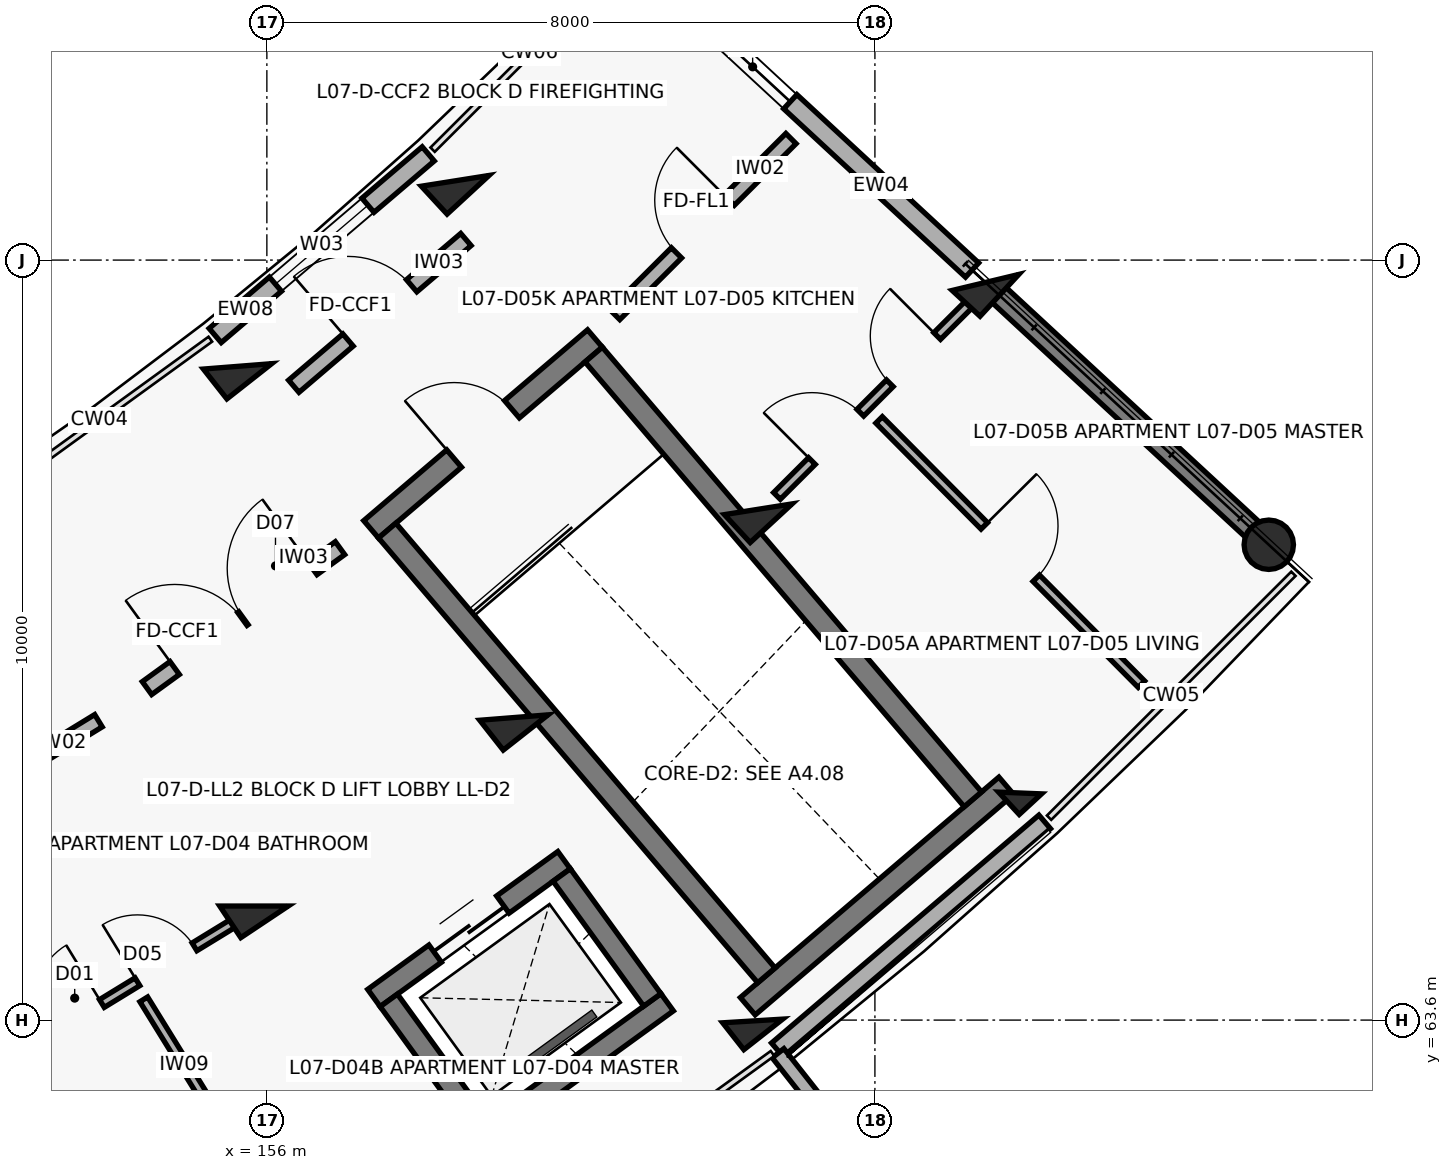
"""IFC4 building model, lengths in metres.
Left out: names, types, materials, properties, quantities, classifications, styles, units other than length and angle.
Written with IfcOpenShell. Run it as: python <this file> out.ifc"""

import sys

from ifc_helpers import new_model, si_unit, direction, frame, frame_2d, origin, origin_2d, place, context, subcontext, project, spatial, rectangle, circle, extrude, element, fill, save


model = new_model("IFC4")
c1 = context("Model", 3, precision=1e-05, world=origin(), true_north=direction((0.0, 1.0)))
c2 = subcontext(c1, "Body", "Model", "MODEL_VIEW")
j1 = project(units=[si_unit("LENGTHUNIT", "METRE"), si_unit("PLANEANGLEUNIT", "RADIAN")], contexts=[c1])
p1 = place(None, origin())
s1 = spatial("IfcSite", under=j1, at=p1, CompositionType="ELEMENT")
p2 = place(p1, origin())
s2 = spatial("IfcBuilding", under=s1, at=p2, CompositionType="ELEMENT")
p3 = place(p2, frame((0.0, 0.0, 23.6)))
s3 = spatial("IfcBuildingStorey", under=s2, at=p3, CompositionType="ELEMENT", Elevation=23.6)
for number, where, z_axis, x_axis in (
    (1, (155.831, 65.101, 0.0), (0.0, 0.0, 1.0), (0.555, -0.832, 0.0)),
    (2, (155.614, 72.202, 0.0), (0.0, 0.0, 1.0), (0.618, -0.786, 0.0)),
    (3, (159.25, 67.581, 0.0), (0.0, 0.0, 1.0), (0.618, -0.786, 0.0)),
):
    element("IfcColumn", number, at=place(p3, frame(where, z_axis=z_axis, x_axis=x_axis)), inside=s3, PredefinedType="COLUMN", context=c2, shape_type="SweptSolid", body=[
        extrude(rectangle(XDim=0.5, YDim=0.75, at=origin_2d()), origin(), (0.0, 0.0, 1.0), 3.1),
    ])
p4 = place(p3, frame((162.392, 63.589, 0.0), z_axis=(0.0, 0.0, 1.0), x_axis=(0.618408395358, -0.785856893175, 0.0)))
e4 = element("IfcColumn", 4, at=p4, inside=s3, PredefinedType="COLUMN", context=c2, shape_type="SweptSolid", body=[
    extrude(rectangle(XDim=0.45, YDim=0.65, at=origin_2d()), origin(), (0.0, 0.0, 1.0), 3.1),
])
for number, where, z_axis, x_axis in (
    (5, (158.477, 74.643, 0.0), (0.0, 0.0, 1.0), (0.678, -0.735, 0.0)),
    (6, (162.465, 70.322, 0.0), (0.0, 0.0, 1.0), (0.678, -0.735, 0.0)),
):
    element("IfcColumn", number, at=place(p3, frame(where, z_axis=z_axis, x_axis=x_axis)), inside=s3, PredefinedType="COLUMN", context=c2, shape_type="SweptSolid", body=[
        extrude(rectangle(XDim=0.5, YDim=0.75, at=origin_2d()), origin(), (0.0, 0.0, 1.0), 3.1),
    ])
p5 = place(p3, frame((165.91, 66.588, 0.0), z_axis=(0.0, 0.0, 1.0), x_axis=(0.678159669868, -0.73491459515, 0.0)))
e7 = element("IfcColumn", 7, at=p5, inside=s3, PredefinedType="COLUMN", context=c2, shape_type="SweptSolid", body=[
    extrude(rectangle(XDim=0.4, YDim=0.4, at=origin_2d()), origin(), (0.0, 0.0, 1.0), 3.1),
])
p6 = place(p3, frame((165.455, 73.306, 0.0), z_axis=(0.0, 0.0, 1.0), x_axis=(0.733729864503, -0.679441304262, 0.0)))
e8 = element("IfcColumn", 8, at=p6, inside=s3, PredefinedType="COLUMN", context=c2, shape_type="SweptSolid", body=[
    extrude(rectangle(XDim=0.5, YDim=0.75, at=origin_2d()), origin(), (0.0, 0.0, 1.0), 3.1),
])
p7 = place(p3, frame((169.182, 69.854, 0.0), z_axis=(0.0, 0.0, 1.0), x_axis=(0.733729864503, -0.679441304262, 0.0)))
e9 = element("IfcColumn", 9, at=p7, inside=s3, PredefinedType="COLUMN", context=c2, shape_type="SweptSolid", body=[
    extrude(circle(Radius=0.325, at=origin_2d()), origin(), (0.0, 0.0, 1.0), 3.1),
])
p8 = place(p3, frame((165.587, 73.184, 0.0), z_axis=(0.0, 0.0, 1.0), x_axis=(0.733739663667, -0.679430721974, 0.0)))
e10 = element("IfcWall", 10, at=p8, inside=s3, PredefinedType="SHEAR", context=c2, shape_type="SweptSolid", body=[
    extrude(rectangle(XDim=4.72, YDim=0.27, at=frame_2d((2.36, 0.0))), origin(), (0.0, 0.0, 1.0), 2.92),
])
p9 = place(p3, frame((162.716, 63.209, 0.0), z_axis=(0.0, 0.0, 1.0), x_axis=(0.760968923704, 0.64878833001, 0.0)))
e11 = element("IfcWall", 11, at=p9, inside=s3, PredefinedType="SOLIDWALL", context=c2, shape_type="SweptSolid", body=[
    extrude(rectangle(XDim=4.623, YDim=0.235, at=frame_2d((2.311, 0.0))), origin(), (0.0, 0.0, 1.0), 2.25),
])
p10 = place(p3, frame((162.726, 63.164, 0.0), z_axis=(0.0, 0.0, 1.0), x_axis=(0.618456270212, -0.785819217019, 0.0)))
e12 = element("IfcWall", 12, at=p10, inside=s3, PredefinedType="PARAPET", context=c2, shape_type="SweptSolid", body=[
    extrude(rectangle(XDim=0.9, YDim=0.195, at=frame_2d((0.45, 0.0))), origin(), (0.0, 0.0, 1.0), 2.25),
])
p11 = place(p3, frame((155.32, 72.608, 0.0), z_axis=(0.0, 0.0, 1.0), x_axis=(0.760985049259, 0.648769415743, 0.0)))
e13 = element("IfcWall", 13, at=p11, inside=s3, PredefinedType="SOLIDWALL", context=c2, shape_type="SweptSolid", body=[
    extrude(rectangle(XDim=3.683, YDim=0.245, at=frame_2d((1.842, 0.0))), origin(), (0.0, 0.0, 1.0), 2.25),
])
p12 = place(p11, frame((1.042, 0.0, 0.32)))
e14 = element("IfcOpeningElement", 14, at=p12, cuts=e13, PredefinedType="OPENING", context=c2, shape_type="SweptSolid", body=[
    extrude(rectangle(XDim=1.6, YDim=1.5, at=frame_2d((0.8, 0.75))), frame((0.0, 0.133, 0.0), z_axis=(0.0, -1.0, 0.0), x_axis=(1.0, 0.0, 0.0)), (0.0, 0.0, 1.0), 0.265),
])
p13 = place(p3, frame((161.316, 77.138, 0.0), z_axis=(0.0, 0.0, 1.0), x_axis=(0.733734795505, -0.679435979225, 0.0)))
e15 = element("IfcWall", 15, at=p13, inside=s3, PredefinedType="SOLIDWALL", context=c2, shape_type="SweptSolid", body=[
    extrude(rectangle(XDim=5.4, YDim=0.255, at=frame_2d((2.7, 0.0))), origin(), (0.0, 0.0, 1.0), 2.24),
])
p14 = place(p13, frame((0.79, 0.0, 0.75)))
e16 = element("IfcOpeningElement", 16, at=p14, cuts=e15, PredefinedType="OPENING", context=c2, shape_type="SweptSolid", body=[
    extrude(rectangle(XDim=1.35, YDim=1.35, at=frame_2d((0.675, 0.675))), frame((0.0, 0.137, 0.0), z_axis=(0.0, -1.0, 0.0), x_axis=(1.0, 0.0, 0.0)), (0.0, 0.0, 1.0), 0.275),
])
p15 = place(p3, frame((157.372, 70.058, 0.0), z_axis=(0.0, 0.0, 1.0), x_axis=(0.760990583254, 0.648762924495, 0.0)))
e17 = element("IfcWall", 17, at=p15, inside=s3, PredefinedType="SHEAR", context=c2, shape_type="SweptSolid", body=[
    extrude(rectangle(XDim=3.87, YDim=0.3, at=frame_2d((1.935, 0.0))), origin(), (0.0, 0.0, 1.0), 3.1),
])
p16 = place(p15, frame((1.435, 0.0, 0.0)))
e18 = element("IfcOpeningElement", 18, at=p16, cuts=e17, PredefinedType="OPENING", context=c2, shape_type="SweptSolid", body=[
    extrude(rectangle(XDim=1.0, YDim=2.15, at=frame_2d((0.5, 1.075))), frame((0.0, 0.16, 0.0), z_axis=(0.0, -1.0, 0.0), x_axis=(1.0, 0.0, 0.0)), (0.0, 0.0, 1.0), 0.32),
])
p17 = place(p3, frame((162.327, 63.783, 0.0), z_axis=(0.0, 0.0, 1.0), x_axis=(0.760969560012, 0.648787583678, 0.0)))
e19 = element("IfcWall", 19, at=p17, inside=s3, PredefinedType="SHEAR", context=c2, shape_type="SweptSolid", body=[
    extrude(rectangle(XDim=4.47, YDim=0.3, at=frame_2d((2.235, 0.0))), origin(), (0.0, 0.0, 1.0), 3.1),
])
p18 = place(p3, frame((157.583, 70.041, 0.0), z_axis=(0.0, 0.0, 1.0), x_axis=(0.648762810187, -0.760990680704, 0.0)))
e20 = element("IfcWall", 20, at=p18, inside=s3, PredefinedType="SHEAR", context=c2, shape_type="SweptSolid", body=[
    extrude(rectangle(XDim=7.69, YDim=0.3, at=frame_2d((3.845, 0.0))), origin(), (0.0, 0.0, 1.0), 3.1),
])
p19 = place(p3, frame((160.3, 72.357, 0.0), z_axis=(0.0, 0.0, 1.0), x_axis=(0.648781194888, -0.760975006922, 0.0)))
e21 = element("IfcWall", 21, at=p19, inside=s3, PredefinedType="SHEAR", context=c2, shape_type="SweptSolid", body=[
    extrude(rectangle(XDim=7.69, YDim=0.3, at=frame_2d((3.845, 0.0))), origin(), (0.0, 0.0, 1.0), 3.1),
])
p20 = place(p3, frame((157.409, 63.89, 0.0), z_axis=(0.0, 0.0, 1.0), x_axis=(0.809510936031, 0.587104798521, 0.0)))
e22 = element("IfcWall", 22, at=p20, inside=s3, PredefinedType="SHEAR", context=c2, shape_type="SweptSolid", body=[
    extrude(rectangle(XDim=3.09, YDim=0.28, at=frame_2d((1.545, 0.0))), origin(), (0.0, 0.0, 1.0), 3.1),
])
p21 = place(p20, frame((0.995, 0.0, 0.0)))
e23 = element("IfcOpeningElement", 23, at=p21, cuts=e22, PredefinedType="OPENING", context=c2, shape_type="SweptSolid", body=[
    extrude(rectangle(XDim=1.1, YDim=2.15, at=frame_2d((0.55, 1.075))), frame((0.0, 0.15, 0.0), z_axis=(0.0, -1.0, 0.0), x_axis=(1.0, 0.0, 0.0)), (0.0, 0.0, 1.0), 0.3),
])
p22 = place(p3, frame((158.765, 62.021, 0.0), z_axis=(0.0, 0.0, 1.0), x_axis=(0.809548485838, 0.587053020669, 0.0)))
e24 = element("IfcWall", 24, at=p22, inside=s3, PredefinedType="SHEAR", context=c2, shape_type="SweptSolid", body=[
    extrude(rectangle(XDim=3.09, YDim=0.28, at=frame_2d((1.545, 0.0))), origin(), (0.0, 0.0, 1.0), 3.1),
])
p23 = place(p3, frame((157.604, 63.859, 0.0), z_axis=(0.0, 0.0, 1.0), x_axis=(0.587127188998, -0.809494696671, 0.0)))
e25 = element("IfcWall", 25, at=p23, inside=s3, PredefinedType="SHEAR", context=c2, shape_type="SweptSolid", body=[
    extrude(rectangle(XDim=2.03, YDim=0.28, at=frame_2d((1.015, 0.0))), origin(), (0.0, 0.0, 1.0), 3.1),
])
p24 = place(p3, frame((159.879, 65.509, 0.0), z_axis=(0.0, 0.0, 1.0), x_axis=(0.58704837408, -0.809551855344, 0.0)))
e26 = element("IfcWall", 26, at=p24, inside=s3, PredefinedType="SHEAR", context=c2, shape_type="SweptSolid", body=[
    extrude(rectangle(XDim=2.03, YDim=0.28, at=frame_2d((1.015, 0.0))), origin(), (0.0, 0.0, 1.0), 3.1),
])
p25 = place(p3, frame((150.989, 65.829, 0.0), z_axis=(0.0, 0.0, 1.0), x_axis=(0.853090237845, 0.521763400492, 0.0)))
e27 = element("IfcWall", 27, at=p25, inside=s3, PredefinedType="SOLIDWALL", context=c2, shape_type="SweptSolid", body=[
    extrude(rectangle(XDim=3.277, YDim=0.19, at=frame_2d((1.638, 0.0))), origin(), (0.0, 0.0, 1.0), 2.14),
])
p26 = place(p25, frame((1.128, 0.0, 0.0)))
e28 = element("IfcOpeningElement", 28, at=p26, cuts=e27, PredefinedType="OPENING", context=c2, shape_type="SweptSolid", body=[
    extrude(rectangle(XDim=1.02, YDim=2.15, at=frame_2d((0.51, 1.075))), frame((0.0, 0.105, 0.0), z_axis=(0.0, -1.0, 0.0), x_axis=(1.0, 0.0, 0.0)), (0.0, 0.0, 1.0), 0.21),
])
p27 = place(p3, frame((152.507, 63.01, 0.0), z_axis=(0.0, 0.0, 1.0), x_axis=(0.853110474662, 0.521730311581, 0.0)))
e29 = element("IfcWall", 29, at=p27, inside=s3, PredefinedType="PARTITIONING", context=c2, shape_type="SweptSolid", body=[
    extrude(rectangle(XDim=3.628, YDim=0.12, at=frame_2d((1.814, 0.0))), origin(), (0.0, 0.0, 1.0), 2.14),
])
p28 = place(p27, frame((0.65, 0.0, 0.0)))
e30 = element("IfcOpeningElement", 30, at=p28, cuts=e29, PredefinedType="OPENING", context=c2, shape_type="SweptSolid", body=[
    extrude(rectangle(XDim=0.9, YDim=2.1, at=frame_2d((0.45, 1.05))), frame((0.0, 0.07, 0.0), z_axis=(0.0, -1.0, 0.0), x_axis=(1.0, 0.0, 0.0)), (0.0, 0.0, 1.0), 0.14),
])
p29 = place(p27, frame((2.098, 0.0, 0.0)))
e31 = element("IfcOpeningElement", 31, at=p29, cuts=e29, PredefinedType="OPENING", context=c2, shape_type="SweptSolid", body=[
    extrude(rectangle(XDim=0.88, YDim=2.1, at=frame_2d((0.44, 1.05))), frame((0.0, 0.07, 0.0), z_axis=(0.0, -1.0, 0.0), x_axis=(1.0, 0.0, 0.0)), (0.0, 0.0, 1.0), 0.14),
])
p30 = place(p3, frame((154.38, 63.873, 0.0), z_axis=(0.0, 0.0, 1.0), x_axis=(0.525458935368, -0.850818962672, 0.0)))
e32 = element("IfcWall", 32, at=p30, inside=s3, PredefinedType="PARTITIONING", context=c2, shape_type="SweptSolid", body=[
    extrude(rectangle(XDim=4.9, YDim=0.12, at=frame_2d((2.45, 0.0))), origin(), (0.0, 0.0, 1.0), 2.14),
])
p31 = place(p30, frame((2.025, 0.0, 0.0)))
e33 = element("IfcOpeningElement", 33, at=p31, cuts=e32, PredefinedType="OPENING", context=c2, shape_type="SweptSolid", body=[
    extrude(rectangle(XDim=0.85, YDim=2.1, at=frame_2d((0.425, 1.05))), frame((0.0, 0.07, 0.0), z_axis=(0.0, -1.0, 0.0), x_axis=(1.0, 0.0, 0.0)), (0.0, 0.0, 1.0), 0.14),
])
p32 = place(p3, frame((154.423, 67.968, 0.0), z_axis=(0.0, 0.0, 1.0), x_axis=(0.809516127005, 0.587097641043, 0.0)))
e34 = element("IfcWall", 34, at=p32, inside=s3, PredefinedType="SOLIDWALL", context=c2, shape_type="SweptSolid", body=[
    extrude(rectangle(XDim=3.137, YDim=0.21, at=frame_2d((1.569, 0.0))), origin(), (0.0, 0.0, 1.0), 2.14),
])
p33 = place(p32, frame((0.45, 0.0, 0.0)))
e35 = element("IfcOpeningElement", 35, at=p33, cuts=e34, PredefinedType="OPENING", context=c2, shape_type="SweptSolid", body=[
    extrude(rectangle(XDim=1.1, YDim=2.15, at=frame_2d((0.55, 1.075))), frame((0.0, 0.115, 0.0), z_axis=(0.0, -1.0, 0.0), x_axis=(1.0, 0.0, 0.0)), (0.0, 0.0, 1.0), 0.23),
])
p34 = place(p32, frame((1.567, 0.0, 0.0)))
e36 = element("IfcOpeningElement", 36, at=p34, cuts=e34, PredefinedType="OPENING", context=c2, shape_type="SweptSolid", body=[
    extrude(rectangle(XDim=1.12, YDim=2.15, at=frame_2d((0.56, 1.075))), frame((0.0, 0.115, 0.0), z_axis=(0.0, -1.0, 0.0), x_axis=(1.0, 0.0, 0.0)), (0.0, 0.0, 1.0), 0.23),
])
p35 = place(p3, frame((156.354, 71.94, 0.0), z_axis=(0.0, 0.0, 1.0), x_axis=(0.760991187621, 0.648762215579, 0.0)))
e37 = element("IfcWall", 37, at=p35, inside=s3, PredefinedType="SOLIDWALL", context=c2, shape_type="SweptSolid", body=[
    extrude(rectangle(XDim=2.976, YDim=0.21, at=frame_2d((1.488, 0.0))), origin(), (0.0, 0.0, 1.0), 2.14),
])
p36 = place(p35, frame((0.938, 0.0, 0.0)))
e38 = element("IfcOpeningElement", 38, at=p36, cuts=e37, PredefinedType="OPENING", context=c2, shape_type="SweptSolid", body=[
    extrude(rectangle(XDim=1.1, YDim=2.15, at=frame_2d((0.55, 1.075))), frame((0.0, 0.115, 0.0), z_axis=(0.0, -1.0, 0.0), x_axis=(1.0, 0.0, 0.0)), (0.0, 0.0, 1.0), 0.23),
])
p37 = place(p3, frame((160.576, 72.884, 0.0), z_axis=(0.0, 0.0, 1.0), x_axis=(0.70773973846, 0.706473256822, 0.0)))
e39 = element("IfcWall", 39, at=p37, inside=s3, PredefinedType="SOLIDWALL", context=c2, shape_type="SweptSolid", body=[
    extrude(rectangle(XDim=3.277, YDim=0.19, at=frame_2d((1.639, 0.0))), origin(), (0.0, 0.0, 1.0), 2.14),
])
p38 = place(p37, frame((1.148, 0.0, 0.0)))
e40 = element("IfcOpeningElement", 40, at=p38, cuts=e39, PredefinedType="OPENING", context=c2, shape_type="SweptSolid", body=[
    extrude(rectangle(XDim=0.98, YDim=2.15, at=frame_2d((0.49, 1.075))), frame((0.0, 0.105, 0.0), z_axis=(0.0, -1.0, 0.0), x_axis=(1.0, 0.0, 0.0)), (0.0, 0.0, 1.0), 0.21),
])
p39 = place(p3, frame((162.711, 70.497, 0.0), z_axis=(0.0, 0.0, 1.0), x_axis=(0.70774573777, 0.706467246706, 0.0)))
e41 = element("IfcWall", 41, at=p39, inside=s3, PredefinedType="PARTITIONING", context=c2, shape_type="SweptSolid", body=[
    extrude(rectangle(XDim=3.628, YDim=0.125, at=frame_2d((1.814, 0.0))), origin(), (0.0, 0.0, 1.0), 2.14),
])
p40 = place(p39, frame((0.65, 0.0, 0.0)))
e42 = element("IfcOpeningElement", 42, at=p40, cuts=e41, PredefinedType="OPENING", context=c2, shape_type="SweptSolid", body=[
    extrude(rectangle(XDim=0.9, YDim=2.1, at=frame_2d((0.45, 1.05))), frame((0.0, 0.073, 0.0), z_axis=(0.0, -1.0, 0.0), x_axis=(1.0, 0.0, 0.0)), (0.0, 0.0, 1.0), 0.145),
])
p41 = place(p39, frame((2.098, 0.0, 0.0)))
e43 = element("IfcOpeningElement", 43, at=p41, cuts=e41, PredefinedType="OPENING", context=c2, shape_type="SweptSolid", body=[
    extrude(rectangle(XDim=0.88, YDim=2.1, at=frame_2d((0.44, 1.05))), frame((0.0, 0.073, 0.0), z_axis=(0.0, -1.0, 0.0), x_axis=(1.0, 0.0, 0.0)), (0.0, 0.0, 1.0), 0.145),
])
p42 = place(p3, frame((164.055, 71.497, 0.0), z_axis=(0.0, 0.0, 1.0), x_axis=(0.704461179749, -0.709742521078, 0.0)))
e44 = element("IfcWall", 44, at=p42, inside=s3, PredefinedType="PARTITIONING", context=c2, shape_type="SweptSolid", body=[
    extrude(rectangle(XDim=4.9, YDim=0.12, at=frame_2d((2.45, 0.0))), origin(), (0.0, 0.0, 1.0), 2.14),
])
p43 = place(p42, frame((1.965, 0.0, 0.0)))
e45 = element("IfcOpeningElement", 45, at=p43, cuts=e44, PredefinedType="OPENING", context=c2, shape_type="SweptSolid", body=[
    extrude(rectangle(XDim=0.97, YDim=2.1, at=frame_2d((0.485, 1.05))), frame((0.0, 0.07, 0.0), z_axis=(0.0, -1.0, 0.0), x_axis=(1.0, 0.0, 0.0)), (0.0, 0.0, 1.0), 0.14),
])
p44 = place(p12, origin())
e46 = element("IfcWindow", 46, at=p44, inside=s3, PartitioningType="DOUBLE_PANEL_VERTICAL", PredefinedType="WINDOW", context=c2, shape_type="SweptSolid", body=[
    extrude(rectangle(XDim=1.6, YDim=1.5, at=frame_2d((0.8, 0.75))), frame((0.0, 0.03, 0.0), z_axis=(0.0, -1.0, 0.0), x_axis=(1.0, 0.0, 0.0)), (0.0, 0.0, 1.0), 0.06),
])
fill(e14, e46)
p45 = place(p14, origin())
e47 = element("IfcWindow", 47, at=p45, inside=s3, PartitioningType="DOUBLE_PANEL_VERTICAL", PredefinedType="WINDOW", context=c2, shape_type="SweptSolid", body=[
    extrude(rectangle(XDim=1.35, YDim=1.35, at=frame_2d((0.675, 0.675))), frame((0.0, 0.03, 0.0), z_axis=(0.0, -1.0, 0.0), x_axis=(1.0, 0.0, 0.0)), (0.0, 0.0, 1.0), 0.06),
])
fill(e16, e47)
p46 = place(p16, origin())
e48 = element("IfcDoor", 48, at=p46, inside=s3, OperationType="SINGLE_SWING_LEFT", PredefinedType="DOOR", context=c2, shape_type="SweptSolid", body=[
    extrude(rectangle(XDim=1.0, YDim=2.15, at=frame_2d((0.5, 1.075))), frame((0.0, 0.025, 0.0), z_axis=(0.0, -1.0, 0.0), x_axis=(1.0, 0.0, 0.0)), (0.0, 0.0, 1.0), 0.05),
])
fill(e18, e48)
p47 = place(p21, origin())
e49 = element("IfcDoor", 49, at=p47, inside=s3, OperationType="DOUBLE_DOOR_SLIDING", PredefinedType="DOOR", context=c2, shape_type="SweptSolid", body=[
    extrude(rectangle(XDim=1.1, YDim=2.15, at=frame_2d((0.55, 1.075))), frame((0.0, 0.025, 0.0), z_axis=(0.0, -1.0, 0.0), x_axis=(1.0, 0.0, 0.0)), (0.0, 0.0, 1.0), 0.05),
])
fill(e23, e49)
p48 = place(p28, origin())
e50 = element("IfcDoor", 50, at=p48, inside=s3, OperationType="SINGLE_SWING_RIGHT", PredefinedType="DOOR", context=c2, shape_type="SweptSolid", body=[
    extrude(rectangle(XDim=0.9, YDim=2.1, at=frame_2d((0.45, 1.05))), frame((0.0, 0.025, 0.0), z_axis=(0.0, -1.0, 0.0), x_axis=(1.0, 0.0, 0.0)), (0.0, 0.0, 1.0), 0.05),
])
fill(e30, e50)
p49 = place(p29, origin())
e51 = element("IfcDoor", 51, at=p49, inside=s3, OperationType="SINGLE_SWING_LEFT", PredefinedType="DOOR", context=c2, shape_type="SweptSolid", body=[
    extrude(rectangle(XDim=0.88, YDim=2.1, at=frame_2d((0.44, 1.05))), frame((0.0, 0.025, 0.0), z_axis=(0.0, -1.0, 0.0), x_axis=(1.0, 0.0, 0.0)), (0.0, 0.0, 1.0), 0.05),
])
fill(e31, e51)
p50 = place(p33, origin())
e52 = element("IfcDoor", 52, at=p50, inside=s3, OperationType="SINGLE_SWING_LEFT", PredefinedType="DOOR", context=c2, shape_type="SweptSolid", body=[
    extrude(rectangle(XDim=1.1, YDim=2.15, at=frame_2d((0.55, 1.075))), frame((0.0, 0.025, 0.0), z_axis=(0.0, -1.0, 0.0), x_axis=(1.0, 0.0, 0.0)), (0.0, 0.0, 1.0), 0.05),
])
fill(e35, e52)
p51 = place(p34, origin())
e53 = element("IfcDoor", 53, at=p51, inside=s3, OperationType="SINGLE_SWING_RIGHT", PredefinedType="DOOR", context=c2, shape_type="SweptSolid", body=[
    extrude(rectangle(XDim=1.12, YDim=2.15, at=frame_2d((0.56, 1.075))), frame((0.0, 0.025, 0.0), z_axis=(0.0, -1.0, 0.0), x_axis=(1.0, 0.0, 0.0)), (0.0, 0.0, 1.0), 0.05),
])
fill(e36, e53)
p52 = place(p36, origin())
e54 = element("IfcDoor", 54, at=p52, inside=s3, OperationType="SINGLE_SWING_LEFT", PredefinedType="DOOR", context=c2, shape_type="SweptSolid", body=[
    extrude(rectangle(XDim=1.1, YDim=2.15, at=frame_2d((0.55, 1.075))), frame((0.0, 0.025, 0.0), z_axis=(0.0, -1.0, 0.0), x_axis=(1.0, 0.0, 0.0)), (0.0, 0.0, 1.0), 0.05),
])
fill(e38, e54)
p53 = place(p38, origin())
e55 = element("IfcDoor", 55, at=p53, inside=s3, OperationType="SINGLE_SWING_RIGHT", PredefinedType="DOOR", context=c2, shape_type="SweptSolid", body=[
    extrude(rectangle(XDim=0.98, YDim=2.15, at=frame_2d((0.49, 1.075))), frame((0.0, 0.025, 0.0), z_axis=(0.0, -1.0, 0.0), x_axis=(1.0, 0.0, 0.0)), (0.0, 0.0, 1.0), 0.05),
])
fill(e40, e55)
p54 = place(p40, origin())
e56 = element("IfcDoor", 56, at=p54, inside=s3, OperationType="SINGLE_SWING_LEFT", PredefinedType="DOOR", context=c2, shape_type="SweptSolid", body=[
    extrude(rectangle(XDim=0.9, YDim=2.1, at=frame_2d((0.45, 1.05))), frame((0.0, 0.025, 0.0), z_axis=(0.0, -1.0, 0.0), x_axis=(1.0, 0.0, 0.0)), (0.0, 0.0, 1.0), 0.05),
])
fill(e42, e56)
p55 = place(p41, origin())
e57 = element("IfcDoor", 57, at=p55, inside=s3, OperationType="SINGLE_SWING_RIGHT", PredefinedType="DOOR", context=c2, shape_type="SweptSolid", body=[
    extrude(rectangle(XDim=0.88, YDim=2.1, at=frame_2d((0.44, 1.05))), frame((0.0, 0.025, 0.0), z_axis=(0.0, -1.0, 0.0), x_axis=(1.0, 0.0, 0.0)), (0.0, 0.0, 1.0), 0.05),
])
fill(e43, e57)
p56 = place(p43, origin())
e58 = element("IfcDoor", 58, at=p56, inside=s3, OperationType="SINGLE_SWING_LEFT", PredefinedType="DOOR", context=c2, shape_type="SweptSolid", body=[
    extrude(rectangle(XDim=0.97, YDim=2.1, at=frame_2d((0.485, 1.05))), frame((0.0, 0.025, 0.0), z_axis=(0.0, -1.0, 0.0), x_axis=(1.0, 0.0, 0.0)), (0.0, 0.0, 1.0), 0.05),
])
fill(e45, e58)
save(model, sys.argv[1])
